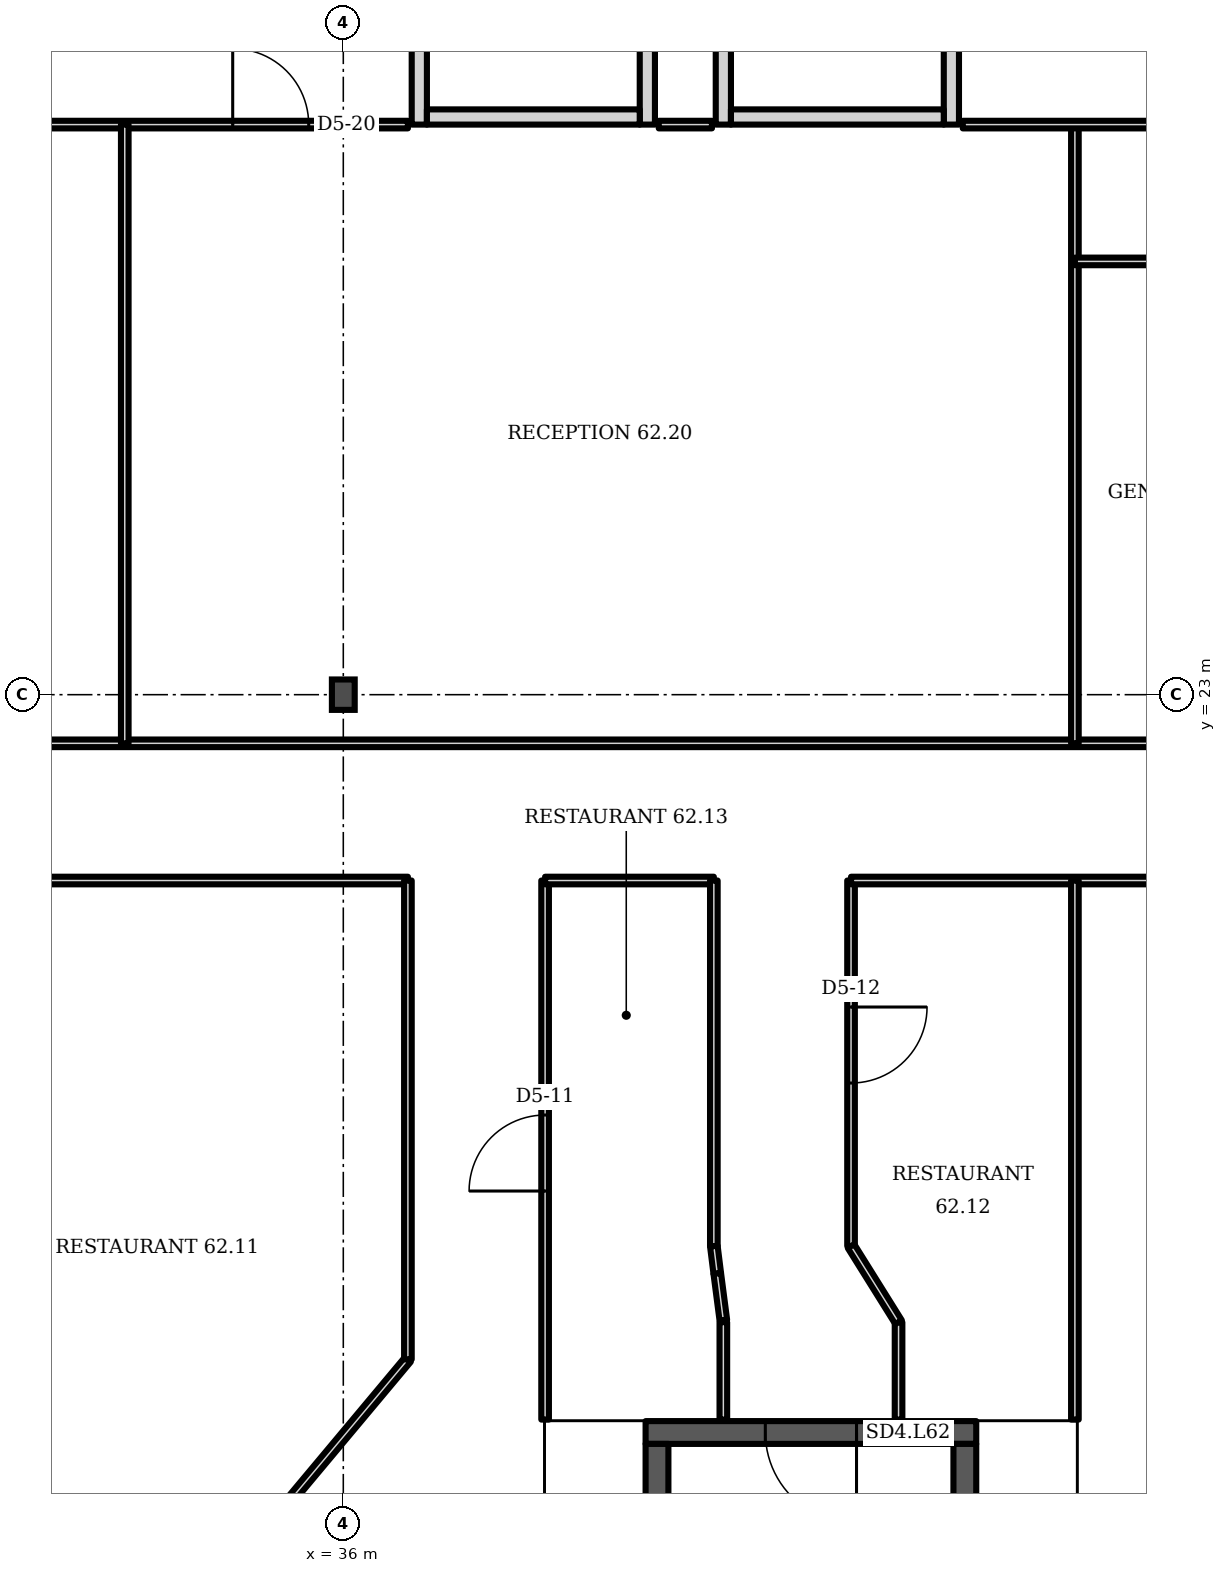
"""IFC4 building model, lengths in metres.
Left out: names, types, materials, properties, quantities, classifications, styles, units other than length and angle.
Written with IfcOpenShell. Run it as: python <this file> out.ifc"""

import sys

from ifc_helpers import new_model, si_unit, direction, frame, frame_2d, origin, origin_2d, place, context, subcontext, project, spatial, rectangle, i_section, extrude, element, fill, save


model = new_model("IFC4")
c1 = context("Model", 3, precision=1e-05, world=origin(), true_north=direction((0.0, 1.0)))
c2 = subcontext(c1, "Body", "Model", "MODEL_VIEW")
j1 = project(units=[si_unit("LENGTHUNIT", "METRE"), si_unit("PLANEANGLEUNIT", "RADIAN")], contexts=[c1])
p1 = place(None, origin())
s1 = spatial("IfcSite", under=j1, at=p1, CompositionType="ELEMENT")
p2 = place(p1, origin())
s2 = spatial("IfcBuilding", under=s1, at=p2, CompositionType="ELEMENT")
p3 = place(p2, frame((0.0, 0.0, 246.7)))
s3 = spatial("IfcBuildingStorey", under=s2, at=p3, CompositionType="ELEMENT", Elevation=246.7)
p4 = place(p3, frame((36.0, 23.0, 0.0), z_axis=(0.0, 0.0, 1.0), x_axis=(1.0, 0.0, 0.0)))
e1 = element("IfcColumn", 1, at=p4, inside=s3, PredefinedType="COLUMN", context=c2, shape_type="SweptSolid", body=[
    extrude(i_section(OverallWidth=0.3, OverallDepth=0.4, WebThickness=0.013, FlangeThickness=0.024, FilletRadius=0.027, at=origin_2d()), origin(), (0.0, 0.0, 1.0), 3.6),
])
p5 = place(p3, frame((37.0, 30.5, 0.0), z_axis=(0.0, 0.0, 1.0), x_axis=(0.0, 1.0, 0.0)))
e2 = element("IfcWall", 2, at=p5, inside=s3, PredefinedType="PARTITIONING", context=c2, shape_type="SweptSolid", body=[
    extrude(rectangle(XDim=3.5, YDim=0.2, at=frame_2d((1.75, 0.0))), origin(), (0.0, 0.0, 1.0), 3.2),
])
p6 = place(p5, frame((1.2, 0.0, 0.0)))
e3 = element("IfcOpeningElement", 3, at=p6, cuts=e2, PredefinedType="OPENING", context=c2, shape_type="SweptSolid", body=[
    extrude(rectangle(XDim=1.1, YDim=2.1, at=frame_2d((0.55, 1.05))), frame((0.0, 0.11, 0.0), z_axis=(0.0, -1.0, 0.0), x_axis=(1.0, 0.0, 0.0)), (0.0, 0.0, 1.0), 0.22),
])
p7 = place(p3, frame((40.0, 30.5, 0.0), z_axis=(0.0, 0.0, 1.0), x_axis=(0.0, 1.0, 0.0)))
e4 = element("IfcWall", 4, at=p7, inside=s3, PredefinedType="PARTITIONING", context=c2, shape_type="SweptSolid", body=[
    extrude(rectangle(XDim=3.5, YDim=0.2, at=frame_2d((1.75, 0.0))), origin(), (0.0, 0.0, 1.0), 3.2),
])
p8 = place(p3, frame((37.1, 30.6, 0.0), z_axis=(0.0, 0.0, 1.0), x_axis=(1.0, 0.0, 0.0)))
e5 = element("IfcWall", 5, at=p8, inside=s3, PredefinedType="PARTITIONING", context=c2, shape_type="SweptSolid", body=[
    extrude(rectangle(XDim=2.8, YDim=0.2, at=frame_2d((1.4, 0.0))), origin(), (0.0, 0.0, 1.0), 3.2),
])
p9 = place(p3, frame((41.0, 30.5, 0.0), z_axis=(0.0, 0.0, 1.0), x_axis=(0.0, 1.0, 0.0)))
e6 = element("IfcWall", 6, at=p9, inside=s3, PredefinedType="PARTITIONING", context=c2, shape_type="SweptSolid", body=[
    extrude(rectangle(XDim=3.5, YDim=0.2, at=frame_2d((1.75, 0.0))), origin(), (0.0, 0.0, 1.0), 3.2),
])
p10 = place(p3, frame((44.0, 30.5, 0.0), z_axis=(0.0, 0.0, 1.0), x_axis=(0.0, 1.0, 0.0)))
e7 = element("IfcWall", 7, at=p10, inside=s3, PredefinedType="PARTITIONING", context=c2, shape_type="SweptSolid", body=[
    extrude(rectangle(XDim=3.5, YDim=0.2, at=frame_2d((1.75, 0.0))), origin(), (0.0, 0.0, 1.0), 3.2),
])
p11 = place(p10, frame((1.2, 0.0, 0.0)))
e8 = element("IfcOpeningElement", 8, at=p11, cuts=e7, PredefinedType="OPENING", context=c2, shape_type="SweptSolid", body=[
    extrude(rectangle(XDim=1.1, YDim=2.1, at=frame_2d((0.55, 1.05))), frame((0.0, 0.11, 0.0), z_axis=(0.0, -1.0, 0.0), x_axis=(1.0, 0.0, 0.0)), (0.0, 0.0, 1.0), 0.22),
])
p12 = place(p3, frame((41.1, 30.6, 0.0), z_axis=(0.0, 0.0, 1.0), x_axis=(1.0, 0.0, 0.0)))
e9 = element("IfcWall", 9, at=p12, inside=s3, PredefinedType="PARTITIONING", context=c2, shape_type="SweptSolid", body=[
    extrude(rectangle(XDim=2.8, YDim=0.2, at=frame_2d((1.4, 0.0))), origin(), (0.0, 0.0, 1.0), 3.2),
])
p13 = place(p3, frame((39.977, 13.293, 0.0), z_axis=(0.0, 0.0, 1.0), x_axis=(1.0, 0.0, 0.0)))
e10 = element("IfcWall", 10, at=p13, inside=s3, PredefinedType="SHEAR", context=c2, shape_type="SweptSolid", body=[
    extrude(rectangle(XDim=4.35, YDim=0.3, at=frame_2d((2.175, 0.0))), origin(), (0.0, 0.0, 1.0), 3.2),
])
p14 = place(p13, frame((1.575, 0.0, 0.0)))
e11 = element("IfcOpeningElement", 11, at=p14, cuts=e10, PredefinedType="OPENING", context=c2, shape_type="SweptSolid", body=[
    extrude(rectangle(XDim=1.2, YDim=2.1, at=frame_2d((0.6, 1.05))), frame((0.0, 0.16, 0.0), z_axis=(0.0, -1.0, 0.0), x_axis=(1.0, 0.0, 0.0)), (0.0, 0.0, 1.0), 0.32),
])
p15 = place(p3, frame((23.02, 20.555, 0.0), z_axis=(0.0, 0.0, 1.0), x_axis=(1.0, 0.0, 0.0)))
e12 = element("IfcWall", 12, at=p15, inside=s3, PredefinedType="PARTITIONING", context=c2, shape_type="SweptSolid", body=[
    extrude(rectangle(XDim=13.83, YDim=0.1, at=frame_2d((6.915, 0.0))), origin(), (0.0, 0.0, 1.0), 3.2),
])
p16 = place(p15, frame((2.605, 0.0, 0.0)))
e13 = element("IfcOpeningElement", 13, at=p16, cuts=e12, PredefinedType="OPENING", context=c2, shape_type="SweptSolid", body=[
    extrude(rectangle(XDim=1.8, YDim=2.1, at=frame_2d((0.9, 1.05))), frame((0.0, 0.06, 0.0), z_axis=(0.0, -1.0, 0.0), x_axis=(1.0, 0.0, 0.0)), (0.0, 0.0, 1.0), 0.12),
])
p17 = place(p3, frame((26.77, 22.36, 0.0), z_axis=(0.0, 0.0, 1.0), x_axis=(1.0, 0.0, 0.0)))
e14 = element("IfcWall", 14, at=p17, inside=s3, PredefinedType="PARTITIONING", context=c2, shape_type="SweptSolid", body=[
    extrude(rectangle(XDim=38.3, YDim=0.1, at=frame_2d((19.15, 0.0))), origin(), (0.0, 0.0, 1.0), 3.2),
])
p18 = place(p3, frame((26.77, 30.5, 0.0), z_axis=(0.0, 0.0, 1.0), x_axis=(1.0, 0.0, 0.0)))
e15 = element("IfcWall", 15, at=p18, inside=s3, PredefinedType="PARTITIONING", context=c2, shape_type="SweptSolid", body=[
    extrude(rectangle(XDim=10.08, YDim=0.1, at=frame_2d((5.04, 0.0))), origin(), (0.0, 0.0, 1.0), 3.2),
])
p19 = place(p18, frame((2.7, 0.0, 0.0)))
e16 = element("IfcOpeningElement", 16, at=p19, cuts=e15, PredefinedType="OPENING", context=c2, shape_type="SweptSolid", body=[
    extrude(rectangle(XDim=1.0, YDim=2.1, at=frame_2d((0.5, 1.05))), frame((0.0, 0.06, 0.0), z_axis=(0.0, -1.0, 0.0), x_axis=(1.0, 0.0, 0.0)), (0.0, 0.0, 1.0), 0.12),
])
p20 = place(p18, frame((7.775, 0.0, 0.0)))
e17 = element("IfcOpeningElement", 17, at=p20, cuts=e15, PredefinedType="OPENING", context=c2, shape_type="SweptSolid", body=[
    extrude(rectangle(XDim=1.0, YDim=2.1, at=frame_2d((0.5, 1.05))), frame((0.0, 0.06, 0.0), z_axis=(0.0, -1.0, 0.0), x_axis=(1.0, 0.0, 0.0)), (0.0, 0.0, 1.0), 0.12),
])
p21 = place(p3, frame((33.125, 22.36, 0.0), z_axis=(0.0, 0.0, 1.0), x_axis=(0.0, 1.0, 0.0)))
e18 = element("IfcWall", 18, at=p21, inside=s3, PredefinedType="PARTITIONING", context=c2, shape_type="SweptSolid", body=[
    extrude(rectangle(XDim=8.14, YDim=0.1, at=frame_2d((4.07, 0.0))), origin(), (0.0, 0.0, 1.0), 3.2),
])
p22 = place(p3, frame((34.04, 10.895, 0.0), z_axis=(0.0, 0.0, 1.0), x_axis=(0.641555, 0.767079, 0.0)))
e19 = element("IfcWall", 19, at=p22, inside=s3, PredefinedType="PARTITIONING", context=c2, shape_type="SweptSolid", body=[
    extrude(rectangle(XDim=4.38, YDim=0.1, at=frame_2d((2.19, 0.0))), origin(), (0.0, 0.0, 1.0), 3.2),
])
p23 = place(p22, frame((0.08, 0.0, 0.0)))
e20 = element("IfcOpeningElement", 20, at=p23, cuts=e19, PredefinedType="OPENING", context=c2, shape_type="SweptSolid", body=[
    extrude(rectangle(XDim=1.0, YDim=2.1, at=frame_2d((0.5, 1.05))), frame((0.0, 0.06, 0.0), z_axis=(0.0, -1.0, 0.0), x_axis=(1.0, 0.0, 0.0)), (0.0, 0.0, 1.0), 0.12),
])
p24 = place(p3, frame((36.85, 14.255, 0.0), z_axis=(0.0, 0.0, 1.0), x_axis=(0.0, 1.0, 0.0)))
e21 = element("IfcWall", 21, at=p24, inside=s3, PredefinedType="PARTITIONING", context=c2, shape_type="SweptSolid", body=[
    extrude(rectangle(XDim=6.3, YDim=0.1, at=frame_2d((3.15, 0.0))), origin(), (0.0, 0.0, 1.0), 3.2),
])
p25 = place(p3, frame((38.655, 13.463, 0.0), z_axis=(0.0, 0.0, 1.0), x_axis=(0.0, 1.0, 0.0)))
e22 = element("IfcWall", 22, at=p25, inside=s3, PredefinedType="PARTITIONING", context=c2, shape_type="SweptSolid", body=[
    extrude(rectangle(XDim=7.092, YDim=0.1, at=frame_2d((3.546, 0.0))), origin(), (0.0, 0.0, 1.0), 3.2),
])
p26 = place(p25, frame((3.007, 0.0, 0.0)))
e23 = element("IfcOpeningElement", 23, at=p26, cuts=e22, PredefinedType="OPENING", context=c2, shape_type="SweptSolid", body=[
    extrude(rectangle(XDim=1.0, YDim=2.1, at=frame_2d((0.5, 1.05))), frame((0.0, 0.06, 0.0), z_axis=(0.0, -1.0, 0.0), x_axis=(1.0, 0.0, 0.0)), (0.0, 0.0, 1.0), 0.12),
])
p27 = place(p3, frame((38.655, 20.555, 0.0), z_axis=(0.0, 0.0, 1.0), x_axis=(1.0, 0.0, 0.0)))
e24 = element("IfcWall", 24, at=p27, inside=s3, PredefinedType="PARTITIONING", context=c2, shape_type="SweptSolid", body=[
    extrude(rectangle(XDim=2.22, YDim=0.1, at=frame_2d((1.11, 0.0))), origin(), (0.0, 0.0, 1.0), 3.2),
])
p28 = place(p3, frame((40.875, 15.745, 0.0), z_axis=(0.0, 0.0, 1.0), x_axis=(0.0, 1.0, 0.0)))
e25 = element("IfcWall", 25, at=p28, inside=s3, PredefinedType="PARTITIONING", context=c2, shape_type="SweptSolid", body=[
    extrude(rectangle(XDim=4.81, YDim=0.1, at=frame_2d((2.405, 0.0))), origin(), (0.0, 0.0, 1.0), 3.2),
])
p29 = place(p3, frame((40.92, 15.385, 0.0), z_axis=(0.0, 0.0, 1.0), x_axis=(-0.123786, 0.992306, 0.0)))
e26 = element("IfcWall", 26, at=p29, inside=s3, PredefinedType="PARTITIONING", context=c2, shape_type="SweptSolid", body=[
    extrude(rectangle(XDim=0.363, YDim=0.1, at=frame_2d((0.181, 0.0))), origin(), (0.0, 0.0, 1.0), 3.2),
])
p30 = place(p3, frame((41.0, 14.77, 0.0), z_axis=(0.0, 0.0, 1.0), x_axis=(-0.12912, 0.991626, 0.0)))
e27 = element("IfcWall", 27, at=p30, inside=s3, PredefinedType="PARTITIONING", context=c2, shape_type="SweptSolid", body=[
    extrude(rectangle(XDim=0.62, YDim=0.1, at=frame_2d((0.31, 0.0))), origin(), (0.0, 0.0, 1.0), 3.2),
])
p31 = place(p3, frame((41.0, 13.463, 0.0), z_axis=(0.0, 0.0, 1.0), x_axis=(0.0, 1.0, 0.0)))
e28 = element("IfcWall", 28, at=p31, inside=s3, PredefinedType="PARTITIONING", context=c2, shape_type="SweptSolid", body=[
    extrude(rectangle(XDim=1.282, YDim=0.1, at=frame_2d((0.641, 0.0))), origin(), (0.0, 0.0, 1.0), 3.2),
])
p32 = place(p3, frame((42.68, 15.745, 0.0), z_axis=(0.0, 0.0, 1.0), x_axis=(0.0, 1.0, 0.0)))
e29 = element("IfcWall", 29, at=p32, inside=s3, PredefinedType="PARTITIONING", context=c2, shape_type="SweptSolid", body=[
    extrude(rectangle(XDim=4.81, YDim=0.1, at=frame_2d((2.405, 0.0))), origin(), (0.0, 0.0, 1.0), 3.2),
])
p33 = place(p32, frame((2.146, 0.0, 0.0)))
e30 = element("IfcOpeningElement", 30, at=p33, cuts=e29, PredefinedType="OPENING", context=c2, shape_type="SweptSolid", body=[
    extrude(rectangle(XDim=1.0, YDim=2.1, at=frame_2d((0.5, 1.05))), frame((0.0, 0.06, 0.0), z_axis=(0.0, -1.0, 0.0), x_axis=(1.0, 0.0, 0.0)), (0.0, 0.0, 1.0), 0.12),
])
p34 = place(p3, frame((42.68, 20.555, 0.0), z_axis=(0.0, 0.0, 1.0), x_axis=(1.0, 0.0, 0.0)))
e31 = element("IfcWall", 31, at=p34, inside=s3, PredefinedType="PARTITIONING", context=c2, shape_type="SweptSolid", body=[
    extrude(rectangle(XDim=19.19, YDim=0.1, at=frame_2d((9.595, 0.0))), origin(), (0.0, 0.0, 1.0), 3.2),
])
p35 = place(p3, frame((43.305, 13.463, 0.0), z_axis=(0.0, 0.0, 1.0), x_axis=(0.0, 1.0, 0.0)))
e32 = element("IfcWall", 32, at=p35, inside=s3, PredefinedType="PARTITIONING", context=c2, shape_type="SweptSolid", body=[
    extrude(rectangle(XDim=1.282, YDim=0.1, at=frame_2d((0.641, 0.0))), origin(), (0.0, 0.0, 1.0), 3.2),
])
p36 = place(p3, frame((43.305, 14.745, 0.0), z_axis=(0.0, 0.0, 1.0), x_axis=(-0.53, 0.848, 0.0)))
e33 = element("IfcWall", 33, at=p36, inside=s3, PredefinedType="PARTITIONING", context=c2, shape_type="SweptSolid", body=[
    extrude(rectangle(XDim=1.179, YDim=0.1, at=frame_2d((0.59, 0.0))), origin(), (0.0, 0.0, 1.0), 3.2),
])
p37 = place(p3, frame((45.625, 13.463, 0.0), z_axis=(0.0, 0.0, 1.0), x_axis=(0.0, 1.0, 0.0)))
e34 = element("IfcWall", 34, at=p37, inside=s3, PredefinedType="PARTITIONING", context=c2, shape_type="SweptSolid", body=[
    extrude(rectangle(XDim=7.092, YDim=0.1, at=frame_2d((3.546, 0.0))), origin(), (0.0, 0.0, 1.0), 3.2),
])
p38 = place(p3, frame((45.625, 22.36, 0.0), z_axis=(0.0, 0.0, 1.0), x_axis=(0.0, 1.0, 0.0)))
e35 = element("IfcWall", 35, at=p38, inside=s3, PredefinedType="PARTITIONING", context=c2, shape_type="SweptSolid", body=[
    extrude(rectangle(XDim=8.13, YDim=0.1, at=frame_2d((4.065, 0.0))), origin(), (0.0, 0.0, 1.0), 3.2),
])
p39 = place(p3, frame((45.625, 28.7, 0.0), z_axis=(0.0, 0.0, 1.0), x_axis=(1.0, 0.0, 0.0)))
e36 = element("IfcWall", 36, at=p39, inside=s3, PredefinedType="PARTITIONING", context=c2, shape_type="SweptSolid", body=[
    extrude(rectangle(XDim=8.0, YDim=0.1, at=frame_2d((4.0, 0.0))), origin(), (0.0, 0.0, 1.0), 3.2),
])
p40 = place(p39, frame((1.07, 0.0, 0.0)))
e37 = element("IfcOpeningElement", 37, at=p40, cuts=e36, PredefinedType="OPENING", context=c2, shape_type="SweptSolid", body=[
    extrude(rectangle(XDim=0.9, YDim=2.1, at=frame_2d((0.45, 1.05))), frame((0.0, 0.06, 0.0), z_axis=(0.0, -1.0, 0.0), x_axis=(1.0, 0.0, 0.0)), (0.0, 0.0, 1.0), 0.12),
])
p41 = place(p39, frame((4.23, 0.0, 0.0)))
e38 = element("IfcOpeningElement", 38, at=p41, cuts=e36, PredefinedType="OPENING", context=c2, shape_type="SweptSolid", body=[
    extrude(rectangle(XDim=0.9, YDim=2.1, at=frame_2d((0.45, 1.05))), frame((0.0, 0.06, 0.0), z_axis=(0.0, -1.0, 0.0), x_axis=(1.0, 0.0, 0.0)), (0.0, 0.0, 1.0), 0.12),
])
p42 = place(p39, frame((6.5, 0.0, 0.0)))
e39 = element("IfcOpeningElement", 39, at=p42, cuts=e36, PredefinedType="OPENING", context=c2, shape_type="SweptSolid", body=[
    extrude(rectangle(XDim=1.0, YDim=2.1, at=frame_2d((0.5, 1.05))), frame((0.0, 0.06, 0.0), z_axis=(0.0, -1.0, 0.0), x_axis=(1.0, 0.0, 0.0)), (0.0, 0.0, 1.0), 0.12),
])
p43 = place(p3, frame((40.15, 30.5, 0.0), z_axis=(0.0, 0.0, 1.0), x_axis=(1.0, 0.0, 0.0)))
e40 = element("IfcWall", 40, at=p43, inside=s3, PredefinedType="PARTITIONING", context=c2, shape_type="SweptSolid", body=[
    extrude(rectangle(XDim=0.7, YDim=0.1, at=frame_2d((0.35, 0.0))), origin(), (0.0, 0.0, 1.0), 3.2),
])
p44 = place(p3, frame((44.15, 30.5, 0.0), z_axis=(0.0, 0.0, 1.0), x_axis=(1.0, 0.0, 0.0)))
e41 = element("IfcWall", 41, at=p44, inside=s3, PredefinedType="PARTITIONING", context=c2, shape_type="SweptSolid", body=[
    extrude(rectangle(XDim=13.85, YDim=0.1, at=frame_2d((6.925, 0.0))), origin(), (0.0, 0.0, 1.0), 3.2),
])
p45 = place(p44, frame((8.695, 0.0, 0.0)))
e42 = element("IfcOpeningElement", 42, at=p45, cuts=e41, PredefinedType="OPENING", context=c2, shape_type="SweptSolid", body=[
    extrude(rectangle(XDim=1.8, YDim=2.1, at=frame_2d((0.9, 1.05))), frame((0.0, 0.06, 0.0), z_axis=(0.0, -1.0, 0.0), x_axis=(1.0, 0.0, 0.0)), (0.0, 0.0, 1.0), 0.12),
])
for number, where, z_axis, x_axis in (
    (43, (40.127, 5.643, 0.0), (0.0, 0.0, 1.0), (0.0, 1.0, 0.0)),
    (44, (44.177, 5.643, 0.0), (0.0, 0.0, 1.0), (0.0, 1.0, 0.0)),
):
    element("IfcWall", number, at=place(p3, frame(where, z_axis=z_axis, x_axis=x_axis)), inside=s3, PredefinedType="SHEAR", context=c2, shape_type="SweptSolid", body=[
        extrude(rectangle(XDim=7.5, YDim=0.3, at=frame_2d((3.75, 0.0))), origin(), (0.0, 0.0, 1.0), 3.2),
    ])
p46 = place(p14, origin())
e45 = element("IfcDoor", 45, at=p46, inside=s3, OperationType="SINGLE_SWING_RIGHT", PredefinedType="DOOR", context=c2, shape_type="SweptSolid", body=[
    extrude(rectangle(XDim=1.2, YDim=2.1, at=frame_2d((0.6, 1.05))), frame((0.0, 0.025, 0.0), z_axis=(0.0, -1.0, 0.0), x_axis=(1.0, 0.0, 0.0)), (0.0, 0.0, 1.0), 0.05),
])
fill(e11, e45)
p47 = place(p26, origin())
e46 = element("IfcDoor", 46, at=p47, inside=s3, OperationType="SINGLE_SWING_LEFT", PredefinedType="DOOR", context=c2, shape_type="SweptSolid", body=[
    extrude(rectangle(XDim=1.0, YDim=2.1, at=frame_2d((0.5, 1.05))), frame((0.0, 0.025, 0.0), z_axis=(0.0, -1.0, 0.0), x_axis=(1.0, 0.0, 0.0)), (0.0, 0.0, 1.0), 0.05),
])
fill(e23, e46)
p48 = place(p33, origin())
e47 = element("IfcDoor", 47, at=p48, inside=s3, OperationType="SINGLE_SWING_RIGHT", PredefinedType="DOOR", context=c2, shape_type="SweptSolid", body=[
    extrude(rectangle(XDim=1.0, YDim=2.1, at=frame_2d((0.5, 1.05))), frame((0.0, 0.025, 0.0), z_axis=(0.0, -1.0, 0.0), x_axis=(1.0, 0.0, 0.0)), (0.0, 0.0, 1.0), 0.05),
])
fill(e30, e47)
p49 = place(p20, origin())
e48 = element("IfcDoor", 48, at=p49, inside=s3, OperationType="SINGLE_SWING_LEFT", PredefinedType="DOOR", context=c2, shape_type="SweptSolid", body=[
    extrude(rectangle(XDim=1.0, YDim=2.1, at=frame_2d((0.5, 1.05))), frame((0.0, 0.025, 0.0), z_axis=(0.0, -1.0, 0.0), x_axis=(1.0, 0.0, 0.0)), (0.0, 0.0, 1.0), 0.05),
])
fill(e17, e48)
save(model, sys.argv[1])
